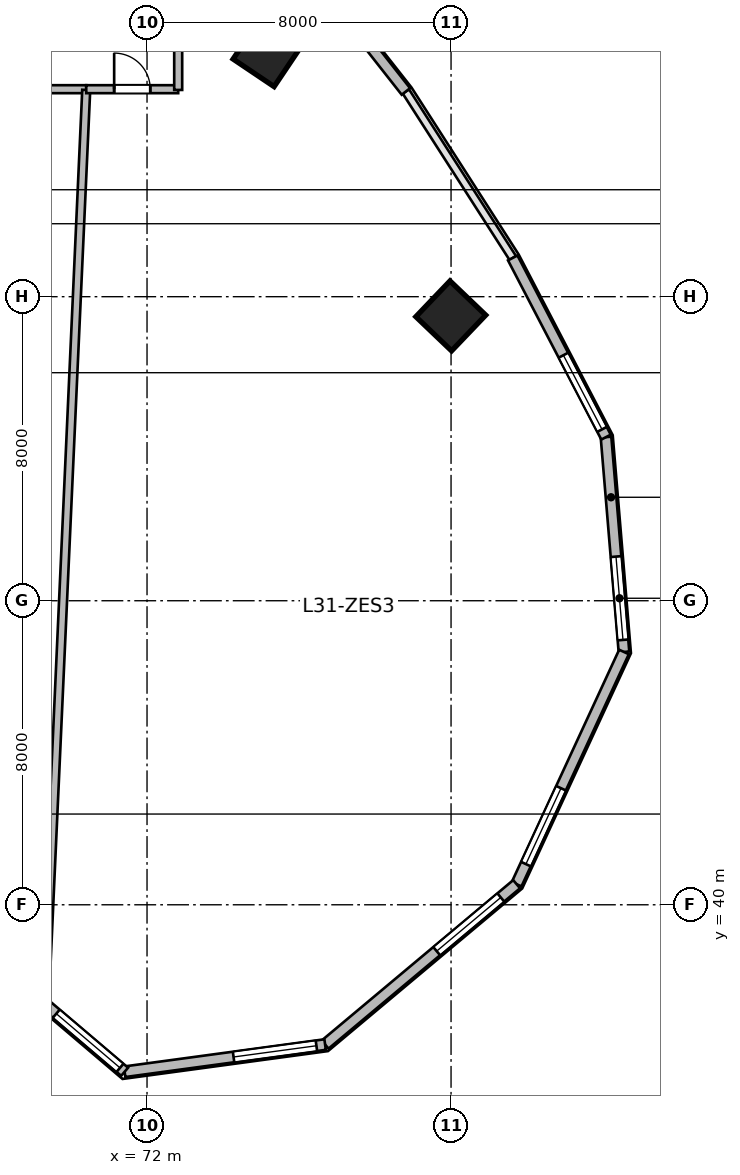
"""IFC4 building model, lengths in metres.
Left out: names, types, materials, properties, quantities, classifications, styles, units other than length and angle.
Written with IfcOpenShell. Run it as: python <this file> out.ifc"""

import sys

from ifc_helpers import new_model, si_unit, direction, frame, frame_2d, origin, origin_2d, place, context, subcontext, project, spatial, rectangle, extrude, source, transform, mapped, element, fill, save


model = new_model("IFC4")
c1 = context("Model", 3, precision=1e-05, world=origin(), true_north=direction((0.0, 1.0)))
c2 = subcontext(c1, "Body", "Model", "MODEL_VIEW")
j1 = project(units=[si_unit("LENGTHUNIT", "METRE"), si_unit("PLANEANGLEUNIT", "RADIAN")], contexts=[c1])
p1 = place(None, origin())
s1 = spatial("IfcSite", under=j1, at=p1, CompositionType="ELEMENT")
p2 = place(p1, origin())
s2 = spatial("IfcBuilding", under=s1, at=p2, CompositionType="ELEMENT")
p3 = place(p2, frame((0.0, 0.0, 131.1)))
s3 = spatial("IfcBuildingStorey", under=s2, at=p3, CompositionType="ELEMENT", Elevation=131.1)
m1 = source(origin(), c2, "Body", "SweptSolid", [
    extrude(rectangle(XDim=1.3, YDim=1.3, at=origin_2d()), origin(), (0.0, 0.0, 1.0), 3.9),
])
for number, where, z_axis, x_axis in (
    (1, (75.167, 62.43, 0.0), (0.0, 0.0, 1.0), (0.558, 0.83, 0.0)),
    (2, (79.993, 55.494, 0.0), (0.0, 0.0, 1.0), (0.691, 0.723, 0.0)),
):
    element("IfcColumn", number, at=place(p3, frame(where, z_axis=z_axis, x_axis=x_axis)), inside=s3, PredefinedType="COLUMN", context=c2, shape_type="MappedRepresentation", body=[
        mapped(m1, transform((0.0, 0.0, 0.0), scale=1.0)),
    ])
m2 = source(origin(), c2, "Body", "SweptSolid", [
    extrude(rectangle(XDim=5.674, YDim=0.28, at=frame_2d((2.837, 0.0))), origin(), (0.0, 0.0, 1.0), 3.65),
])
p4 = place(p3, frame((84.078, 52.305, 0.0), z_axis=(0.0, 0.0, 1.0), x_axis=(0.083309007867, -0.996523762491, 0.0)))
e3 = element("IfcWall", 3, at=p4, inside=s3, PredefinedType="SOLIDWALL", context=c2, shape_type="MappedRepresentation", body=[
    mapped(m2, transform((0.0, 0.0, 0.0), scale=1.0)),
])
p5 = place(p4, frame((3.155, 0.0, 0.95)))
e4 = element("IfcOpeningElement", 4, at=p5, cuts=e3, PredefinedType="OPENING", context=c2, shape_type="SweptSolid", body=[
    extrude(rectangle(XDim=2.2, YDim=2.1, at=frame_2d((1.1, 1.05))), frame((0.0, 0.15, 0.0), z_axis=(0.0, -1.0, 0.0), x_axis=(1.0, 0.0, 0.0)), (0.0, 0.0, 1.0), 0.3),
])
m3 = source(origin(), c2, "Body", "SweptSolid", [
    extrude(rectangle(XDim=6.732, YDim=0.28, at=frame_2d((3.366, 0.0))), origin(), (0.0, 0.0, 1.0), 3.65),
])
p6 = place(p3, frame((84.55, 46.652, 0.0), z_axis=(0.0, 0.0, 1.0), x_axis=(-0.419644552709, -0.907688520023, 0.0)))
e5 = element("IfcWall", 5, at=p6, inside=s3, PredefinedType="SOLIDWALL", context=c2, shape_type="MappedRepresentation", body=[
    mapped(m3, transform((0.0, 0.0, 0.0), scale=1.0)),
])
p7 = place(p6, frame((3.949, 0.0, 0.95)))
e6 = element("IfcOpeningElement", 6, at=p7, cuts=e5, PredefinedType="OPENING", context=c2, shape_type="SweptSolid", body=[
    extrude(rectangle(XDim=2.2, YDim=2.1, at=frame_2d((1.1, 1.05))), frame((0.0, 0.15, 0.0), z_axis=(0.0, -1.0, 0.0), x_axis=(1.0, 0.0, 0.0)), (0.0, 0.0, 1.0), 0.3),
])
m4 = source(origin(), c2, "Body", "SweptSolid", [
    extrude(rectangle(XDim=6.573, YDim=0.28, at=frame_2d((3.287, 0.0))), origin(), (0.0, 0.0, 1.0), 3.65),
])
p8 = place(p3, frame((81.725, 40.541, 0.0), z_axis=(0.0, 0.0, 1.0), x_axis=(-0.766715154163, -0.641987439423, 0.0)))
e7 = element("IfcWall", 7, at=p8, inside=s3, PredefinedType="SOLIDWALL", context=c2, shape_type="MappedRepresentation", body=[
    mapped(m4, transform((0.0, 0.0, 0.0), scale=1.0)),
])
p9 = place(p8, frame((0.543, 0.0, 0.95)))
e8 = element("IfcOpeningElement", 8, at=p9, cuts=e7, PredefinedType="OPENING", context=c2, shape_type="SweptSolid", body=[
    extrude(rectangle(XDim=2.2, YDim=2.1, at=frame_2d((1.1, 1.05))), frame((0.0, 0.15, 0.0), z_axis=(0.0, -1.0, 0.0), x_axis=(1.0, 0.0, 0.0)), (0.0, 0.0, 1.0), 0.3),
])
m5 = source(origin(), c2, "Body", "SweptSolid", [
    extrude(rectangle(XDim=5.324, YDim=0.28, at=frame_2d((2.662, 0.0))), origin(), (0.0, 0.0, 1.0), 3.65),
])
p10 = place(p3, frame((76.686, 36.322, 0.0), z_axis=(0.0, 0.0, 1.0), x_axis=(-0.990931467223, -0.134368252451, 0.0)))
e9 = element("IfcWall", 9, at=p10, inside=s3, PredefinedType="SOLIDWALL", context=c2, shape_type="MappedRepresentation", body=[
    mapped(m5, transform((0.0, 0.0, 0.0), scale=1.0)),
])
p11 = place(p10, frame((0.231, 0.0, 0.95)))
e10 = element("IfcOpeningElement", 10, at=p11, cuts=e9, PredefinedType="OPENING", context=c2, shape_type="SweptSolid", body=[
    extrude(rectangle(XDim=2.2, YDim=2.1, at=frame_2d((1.1, 1.05))), frame((0.0, 0.15, 0.0), z_axis=(0.0, -1.0, 0.0), x_axis=(1.0, 0.0, 0.0)), (0.0, 0.0, 1.0), 0.3),
])
m6 = source(origin(), c2, "Body", "SweptSolid", [
    extrude(rectangle(XDim=4.659, YDim=0.28, at=frame_2d((2.33, 0.0))), origin(), (0.0, 0.0, 1.0), 3.65),
])
p12 = place(p3, frame((71.41, 35.606, 0.0), z_axis=(0.0, 0.0, 1.0), x_axis=(-0.761913458795, 0.647678841176, 0.0)))
e11 = element("IfcWall", 11, at=p12, inside=s3, PredefinedType="SOLIDWALL", context=c2, shape_type="MappedRepresentation", body=[
    mapped(m6, transform((0.0, 0.0, 0.0), scale=1.0)),
])
p13 = place(p12, frame((0.16, 0.0, 0.95)))
e12 = element("IfcOpeningElement", 12, at=p13, cuts=e11, PredefinedType="OPENING", context=c2, shape_type="SweptSolid", body=[
    extrude(rectangle(XDim=2.2, YDim=2.1, at=frame_2d((1.1, 1.05))), frame((0.0, 0.15, 0.0), z_axis=(0.0, -1.0, 0.0), x_axis=(1.0, 0.0, 0.0)), (0.0, 0.0, 1.0), 0.3),
])
m7 = source(origin(), c2, "Body", "SweptSolid", [
    extrude(rectangle(XDim=5.058, YDim=0.28, at=frame_2d((2.529, 0.0))), origin(), (0.0, 0.0, 1.0), 3.65),
])
p14 = place(p3, frame((75.685, 65.376, 0.0), z_axis=(0.0, 0.0, 1.0), x_axis=(0.618145507434, -0.786063694391, 0.0)))
e13 = element("IfcWall", 13, at=p14, inside=s3, PredefinedType="SOLIDWALL", context=c2, shape_type="MappedRepresentation", body=[
    mapped(m7, transform((0.0, 0.0, 0.0), scale=1.0)),
])
m8 = source(origin(), c2, "Body", "SweptSolid", [
    extrude(rectangle(XDim=5.315, YDim=0.28, at=frame_2d((2.658, 0.0))), origin(), (0.0, 0.0, 1.0), 3.65),
])
p15 = place(p3, frame((81.623, 57.02, 0.0), z_axis=(0.0, 0.0, 1.0), x_axis=(0.461760527822, -0.887004630735, 0.0)))
e14 = element("IfcWall", 14, at=p15, inside=s3, PredefinedType="SOLIDWALL", context=c2, shape_type="MappedRepresentation", body=[
    mapped(m8, transform((0.0, 0.0, 0.0), scale=1.0)),
])
p16 = place(p15, frame((2.886, 0.0, 0.95)))
e15 = element("IfcOpeningElement", 15, at=p16, cuts=e14, PredefinedType="OPENING", context=c2, shape_type="SweptSolid", body=[
    extrude(rectangle(XDim=2.2, YDim=2.1, at=frame_2d((1.1, 1.05))), frame((0.0, 0.15, 0.0), z_axis=(0.0, -1.0, 0.0), x_axis=(1.0, 0.0, 0.0)), (0.0, 0.0, 1.0), 0.3),
])
m9 = source(origin(), c2, "Body", "SweptSolid", [
    extrude(rectangle(XDim=4.6, YDim=0.21, at=frame_2d((2.3, 0.0))), origin(), (0.0, 0.0, 1.0), 3.65),
])
p17 = place(p3, frame((65.8, 61.46, 0.0), z_axis=(0.0, 0.0, 1.0), x_axis=(1.0, 0.0, 0.0)))
e16 = element("IfcWall", 16, at=p17, inside=s3, PredefinedType="PARTITIONING", context=c2, shape_type="MappedRepresentation", body=[
    mapped(m9, transform((0.0, 0.0, 0.0), scale=1.0)),
])
p18 = place(p17, frame((1.825, 0.0, 0.0)))
e17 = element("IfcOpeningElement", 17, at=p18, cuts=e16, PredefinedType="OPENING", context=c2, shape_type="SweptSolid", body=[
    extrude(rectangle(XDim=0.95, YDim=2.1, at=frame_2d((0.475, 1.05))), frame((0.0, 0.115, 0.0), z_axis=(0.0, -1.0, 0.0), x_axis=(1.0, 0.0, 0.0)), (0.0, 0.0, 1.0), 0.23),
])
m10 = source(origin(), c2, "Body", "SweptSolid", [
    extrude(rectangle(XDim=24.224, YDim=0.21, at=frame_2d((12.112, 0.0))), origin(), (0.0, 0.0, 1.0), 2.942),
])
p19 = place(p3, frame((69.302, 37.241, 0.0), z_axis=(0.0, 0.0, 1.0), x_axis=(0.045312570313, 0.998972857975, 0.0)))
e18 = element("IfcWall", 18, at=p19, inside=s3, PredefinedType="PARTITIONING", context=c2, shape_type="MappedRepresentation", body=[
    mapped(m10, transform((0.0, 0.0, 0.0), scale=1.0)),
])
m11 = source(origin(), c2, "Body", "SweptSolid", [
    extrude(rectangle(XDim=2.42, YDim=0.21, at=frame_2d((1.21, 0.0))), origin(), (0.0, 0.0, 1.0), 3.65),
])
p20 = place(p3, frame((70.4, 61.46, 0.0), z_axis=(0.0, 0.0, 1.0), x_axis=(1.0, 0.0, 0.0)))
e19 = element("IfcWall", 19, at=p20, inside=s3, PredefinedType="PARTITIONING", context=c2, shape_type="MappedRepresentation", body=[
    mapped(m11, transform((0.0, 0.0, 0.0), scale=1.0)),
])
p21 = place(p20, frame((0.735, 0.0, 0.0)))
e20 = element("IfcOpeningElement", 20, at=p21, cuts=e19, PredefinedType="OPENING", context=c2, shape_type="SweptSolid", body=[
    extrude(rectangle(XDim=0.95, YDim=2.1, at=frame_2d((0.475, 1.05))), frame((0.0, 0.115, 0.0), z_axis=(0.0, -1.0, 0.0), x_axis=(1.0, 0.0, 0.0)), (0.0, 0.0, 1.0), 0.23),
])
m12 = source(origin(), c2, "Body", "SweptSolid", [
    extrude(rectangle(XDim=2.62, YDim=0.21, at=frame_2d((1.31, 0.0))), origin(), (0.0, 0.0, 1.0), 3.28),
])
p22 = place(p3, frame((72.82, 61.44, 0.0), z_axis=(0.0, 0.0, 1.0), x_axis=(0.0, 1.0, 0.0)))
e21 = element("IfcWall", 21, at=p22, inside=s3, PredefinedType="PARTITIONING", context=c2, shape_type="MappedRepresentation", body=[
    mapped(m12, transform((0.0, 0.0, 0.0), scale=1.0)),
])
m13 = source(origin(), c2, "Body", "SweptSolid", [
    extrude(rectangle(XDim=2.2, YDim=2.1, at=frame_2d((1.1, 1.05))), frame((0.0, 0.03, 0.0), z_axis=(0.0, -1.0, 0.0), x_axis=(1.0, 0.0, 0.0)), (0.0, 0.0, 1.0), 0.06),
])
p23 = place(p5, origin())
e22 = element("IfcWindow", 22, at=p23, inside=s3, PartitioningType="TRIPLE_PANEL_VERTICAL", PredefinedType="WINDOW", context=c2, shape_type="MappedRepresentation", body=[
    mapped(m13, transform((0.0, 0.0, 0.0), scale=1.0)),
])
fill(e4, e22)
p24 = place(p7, origin())
e23 = element("IfcWindow", 23, at=p24, inside=s3, PartitioningType="TRIPLE_PANEL_VERTICAL", PredefinedType="WINDOW", context=c2, shape_type="MappedRepresentation", body=[
    mapped(m13, transform((0.0, 0.0, 0.0), scale=1.0)),
])
fill(e6, e23)
p25 = place(p9, origin())
e24 = element("IfcWindow", 24, at=p25, inside=s3, PartitioningType="TRIPLE_PANEL_VERTICAL", PredefinedType="WINDOW", context=c2, shape_type="MappedRepresentation", body=[
    mapped(m13, transform((0.0, 0.0, 0.0), scale=1.0)),
])
fill(e8, e24)
p26 = place(p11, origin())
e25 = element("IfcWindow", 25, at=p26, inside=s3, PartitioningType="TRIPLE_PANEL_VERTICAL", PredefinedType="WINDOW", context=c2, shape_type="MappedRepresentation", body=[
    mapped(m13, transform((0.0, 0.0, 0.0), scale=1.0)),
])
fill(e10, e25)
p27 = place(p13, origin())
e26 = element("IfcWindow", 26, at=p27, inside=s3, PartitioningType="TRIPLE_PANEL_VERTICAL", PredefinedType="WINDOW", context=c2, shape_type="MappedRepresentation", body=[
    mapped(m13, transform((0.0, 0.0, 0.0), scale=1.0)),
])
fill(e12, e26)
p28 = place(p16, origin())
e27 = element("IfcWindow", 27, at=p28, inside=s3, PartitioningType="TRIPLE_PANEL_VERTICAL", PredefinedType="WINDOW", context=c2, shape_type="MappedRepresentation", body=[
    mapped(m13, transform((0.0, 0.0, 0.0), scale=1.0)),
])
fill(e15, e27)
m14 = source(origin(), c2, "Body", "SweptSolid", [
    extrude(rectangle(XDim=0.95, YDim=2.1, at=frame_2d((0.475, 1.05))), frame((0.0, 0.025, 0.0), z_axis=(0.0, -1.0, 0.0), x_axis=(1.0, 0.0, 0.0)), (0.0, 0.0, 1.0), 0.05),
])
p29 = place(p21, origin())
e28 = element("IfcDoor", 28, at=p29, inside=s3, OperationType="SINGLE_SWING_LEFT", PredefinedType="DOOR", context=c2, shape_type="MappedRepresentation", body=[
    mapped(m14, transform((0.0, 0.0, 0.0), scale=1.0)),
])
fill(e20, e28)
save(model, sys.argv[1])
